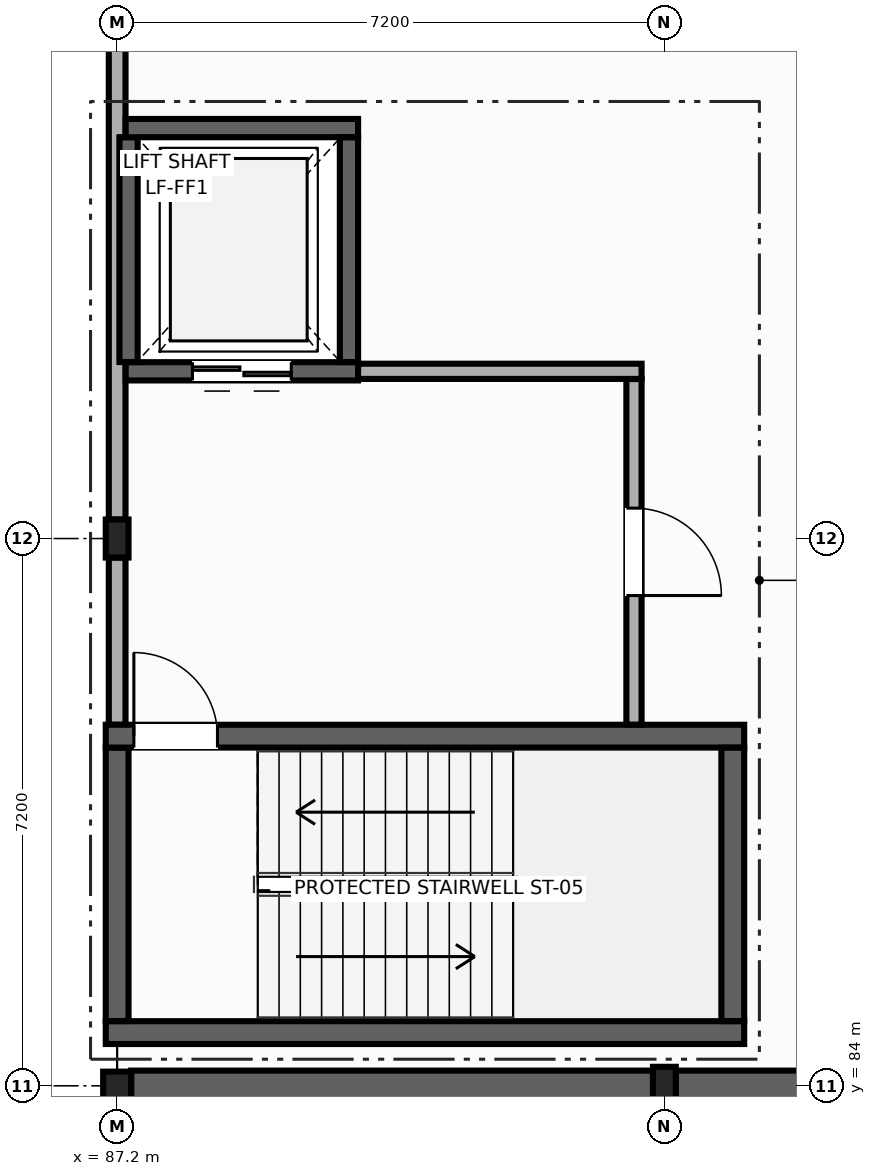
"""IFC4 building model, lengths in metres.
Left out: names, types, materials, properties, quantities, classifications, styles, units other than length and angle.
Written with IfcOpenShell. Run it as: python <this file> out.ifc"""

import sys

from ifc_helpers import new_model, si_unit, direction, frame, frame_2d, origin, origin_2d, place, context, subcontext, project, spatial, rectangle, i_section, extrude, element, fill, save


model = new_model("IFC4")
c1 = context("Model", 3, precision=1e-05, world=origin(), true_north=direction((0.0, 1.0)))
c2 = subcontext(c1, "Body", "Model", "MODEL_VIEW")
j1 = project(units=[si_unit("LENGTHUNIT", "METRE"), si_unit("PLANEANGLEUNIT", "RADIAN")], contexts=[c1])
p1 = place(None, origin())
s1 = spatial("IfcSite", under=j1, at=p1, CompositionType="ELEMENT")
p2 = place(p1, origin())
s2 = spatial("IfcBuilding", under=s1, at=p2, CompositionType="ELEMENT")
p3 = place(p2, frame((0.0, 0.0, 9.9)))
s3 = spatial("IfcBuildingStorey", under=s2, at=p3, CompositionType="ELEMENT", Elevation=9.9)
p4 = place(p3, frame((87.2, 84.0, 0.0), z_axis=(0.0, 0.0, 1.0), x_axis=(0.0, 1.0, 0.0)))
e1 = element("IfcColumn", 1, at=p4, inside=s3, PredefinedType="COLUMN", context=c2, shape_type="SweptSolid", body=[
    extrude(i_section(OverallWidth=0.373, OverallDepth=0.368, WebThickness=0.014, FlangeThickness=0.024, at=origin_2d()), origin(), (0.0, 0.0, 1.0), 4.5),
])
for number, where, z_axis, x_axis in (
    (2, (94.4, 84.0, 0.0), (0.0, 0.0, 1.0), (1.0, 0.0, 0.0)),
    (3, (87.2, 91.2, 0.0), (0.0, 0.0, 1.0), (1.0, 0.0, 0.0)),
):
    element("IfcColumn", number, at=place(p3, frame(where, z_axis=z_axis, x_axis=x_axis)), inside=s3, PredefinedType="COLUMN", context=c2, shape_type="SweptSolid", body=[
        extrude(i_section(OverallWidth=0.3, OverallDepth=0.5, WebThickness=0.014, FlangeThickness=0.028, at=origin_2d()), origin(), (0.0, 0.0, 1.0), 4.5),
    ])
p5 = place(p3, frame((87.2, 88.75, 0.0), z_axis=(0.0, 0.0, 1.0), x_axis=(0.0, 1.0, 0.0)))
e4 = element("IfcWall", 4, at=p5, inside=s3, PredefinedType="SOLIDWALL", context=c2, shape_type="SweptSolid", body=[
    extrude(rectangle(XDim=2.2, YDim=0.22, at=frame_2d((1.1, 0.0))), origin(), (0.0, 0.0, 1.0), 3.645),
])
p6 = place(p3, frame((87.2, 91.45, 0.0), z_axis=(0.0, 0.0, 1.0), x_axis=(0.0, 1.0, 0.0)))
e5 = element("IfcWall", 5, at=p6, inside=s3, PredefinedType="SOLIDWALL", context=c2, shape_type="SweptSolid", body=[
    extrude(rectangle(XDim=6.8, YDim=0.22, at=frame_2d((3.4, 0.0))), origin(), (0.0, 0.0, 1.0), 3.655),
])
p7 = place(p3, frame((95.45, 84.7, 0.0), z_axis=(0.0, 0.0, 1.0), x_axis=(-1.0, 0.0, 0.0)))
e6 = element("IfcWall", 6, at=p7, inside=s3, PredefinedType="SHEAR", context=c2, shape_type="SweptSolid", body=[
    extrude(rectangle(XDim=8.4, YDim=0.3, at=frame_2d((4.2, 0.0))), origin(), (0.0, 0.0, 1.0), 4.26),
])
p8 = place(p3, frame((87.2, 84.852, 0.0), z_axis=(0.0, 0.0, 1.0), x_axis=(0.0, 1.0, 0.0)))
e7 = element("IfcWall", 7, at=p8, inside=s3, PredefinedType="SHEAR", context=c2, shape_type="SweptSolid", body=[
    extrude(rectangle(XDim=3.598, YDim=0.3, at=frame_2d((1.799, 0.0))), origin(), (0.0, 0.0, 1.0), 4.26),
])
p9 = place(p3, frame((87.05, 88.6, 0.0), z_axis=(0.0, 0.0, 1.0), x_axis=(1.0, 0.0, 0.0)))
e8 = element("IfcWall", 8, at=p9, inside=s3, PredefinedType="SHEAR", context=c2, shape_type="SweptSolid", body=[
    extrude(rectangle(XDim=8.4, YDim=0.3, at=frame_2d((4.2, 0.0))), origin(), (0.0, 0.0, 1.0), 4.26),
])
p10 = place(p9, frame((0.37, 0.0, 0.0)))
e9 = element("IfcOpeningElement", 9, at=p10, cuts=e8, PredefinedType="OPENING", context=c2, shape_type="SweptSolid", body=[
    extrude(rectangle(XDim=1.1, YDim=2.15, at=frame_2d((0.55, 1.075))), frame((0.0, 0.16, 0.0), z_axis=(0.0, -1.0, 0.0), x_axis=(1.0, 0.0, 0.0)), (0.0, 0.0, 1.0), 0.32),
])
p11 = place(p3, frame((95.3, 88.448, 0.0), z_axis=(0.0, 0.0, 1.0), x_axis=(0.0, -1.0, 0.0)))
e10 = element("IfcWall", 10, at=p11, inside=s3, PredefinedType="SHEAR", context=c2, shape_type="SweptSolid", body=[
    extrude(rectangle(XDim=3.596, YDim=0.3, at=frame_2d((1.798, 0.0))), origin(), (0.0, 0.0, 1.0), 4.26),
])
p12 = place(p3, frame((90.37, 93.4, 0.0), z_axis=(0.0, 0.0, 1.0), x_axis=(-1.0, 0.0, 0.0)))
e11 = element("IfcWall", 11, at=p12, inside=s3, PredefinedType="SHEAR", context=c2, shape_type="SweptSolid", body=[
    extrude(rectangle(XDim=3.058, YDim=0.24, at=frame_2d((1.529, 0.0))), origin(), (0.0, 0.0, 1.0), 4.26),
])
p13 = place(p12, frame((0.879, 0.0, 0.0)))
e12 = element("IfcOpeningElement", 12, at=p13, cuts=e11, PredefinedType="OPENING", context=c2, shape_type="SweptSolid", body=[
    extrude(rectangle(XDim=1.3, YDim=2.15, at=frame_2d((0.65, 1.075))), frame((0.0, 0.13, 0.0), z_axis=(0.0, -1.0, 0.0), x_axis=(1.0, 0.0, 0.0)), (0.0, 0.0, 1.0), 0.26),
])
p14 = place(p3, frame((87.35, 93.522, 0.0), z_axis=(0.0, 0.0, 1.0), x_axis=(0.0, 1.0, 0.0)))
e13 = element("IfcWall", 13, at=p14, inside=s3, PredefinedType="SHEAR", context=c2, shape_type="SweptSolid", body=[
    extrude(rectangle(XDim=2.958, YDim=0.24, at=frame_2d((1.479, 0.0))), origin(), (0.0, 0.0, 1.0), 4.26),
])
p15 = place(p3, frame((87.312, 96.6, 0.0), z_axis=(0.0, 0.0, 1.0), x_axis=(1.0, 0.0, 0.0)))
e14 = element("IfcWall", 14, at=p15, inside=s3, PredefinedType="SHEAR", context=c2, shape_type="SweptSolid", body=[
    extrude(rectangle(XDim=3.058, YDim=0.24, at=frame_2d((1.529, 0.0))), origin(), (0.0, 0.0, 1.0), 4.26),
])
p16 = place(p3, frame((90.25, 96.478, 0.0), z_axis=(0.0, 0.0, 1.0), x_axis=(0.0, -1.0, 0.0)))
e15 = element("IfcWall", 15, at=p16, inside=s3, PredefinedType="SHEAR", context=c2, shape_type="SweptSolid", body=[
    extrude(rectangle(XDim=2.956, YDim=0.24, at=frame_2d((1.478, 0.0))), origin(), (0.0, 0.0, 1.0), 4.26),
])
p17 = place(p3, frame((90.37, 93.4, 0.0), z_axis=(0.0, 0.0, 1.0), x_axis=(1.0, 0.0, 0.0)))
e16 = element("IfcWall", 16, at=p17, inside=s3, PredefinedType="PARTITIONING", context=c2, shape_type="SweptSolid", body=[
    extrude(rectangle(XDim=3.73, YDim=0.2, at=frame_2d((1.865, 0.0))), origin(), (0.0, 0.0, 1.0), 4.26),
])
p18 = place(p3, frame((94.0, 93.298, 0.0), z_axis=(0.0, 0.0, 1.0), x_axis=(0.0, -1.0, 0.0)))
e17 = element("IfcWall", 17, at=p18, inside=s3, PredefinedType="PARTITIONING", context=c2, shape_type="SweptSolid", body=[
    extrude(rectangle(XDim=4.546, YDim=0.2, at=frame_2d((2.273, 0.0))), origin(), (0.0, 0.0, 1.0), 4.26),
])
p19 = place(p18, frame((1.698, 0.0, 0.0)))
e18 = element("IfcOpeningElement", 18, at=p19, cuts=e17, PredefinedType="OPENING", context=c2, shape_type="SweptSolid", body=[
    extrude(rectangle(XDim=1.15, YDim=2.15, at=frame_2d((0.575, 1.075))), frame((0.0, 0.11, 0.0), z_axis=(0.0, -1.0, 0.0), x_axis=(1.0, 0.0, 0.0)), (0.0, 0.0, 1.0), 0.22),
])
p20 = place(p3, frame((87.384, 84.0, 0.0), z_axis=(0.0, 0.0, 1.0), x_axis=(1.0, 0.0, 0.0)))
e19 = element("IfcWall", 19, at=p20, inside=s3, PredefinedType="SHEAR", context=c2, shape_type="SweptSolid", body=[
    extrude(rectangle(XDim=6.866, YDim=0.4, at=frame_2d((3.433, 0.0))), origin(), (0.0, 0.0, 1.0), 4.25),
])
p21 = place(p3, frame((94.55, 84.0, 0.0), z_axis=(0.0, 0.0, 1.0), x_axis=(1.0, 0.0, 0.0)))
e20 = element("IfcWall", 20, at=p21, inside=s3, PredefinedType="SHEAR", context=c2, shape_type="SweptSolid", body=[
    extrude(rectangle(XDim=6.8, YDim=0.4, at=frame_2d((3.4, 0.0))), origin(), (0.0, 0.0, 1.0), 4.26),
])
p22 = place(p10, origin())
e21 = element("IfcDoor", 21, at=p22, inside=s3, OperationType="SINGLE_SWING_LEFT", PredefinedType="DOOR", context=c2, shape_type="SweptSolid", body=[
    extrude(rectangle(XDim=1.1, YDim=2.15, at=frame_2d((0.55, 1.075))), frame((0.0, 0.025, 0.0), z_axis=(0.0, -1.0, 0.0), x_axis=(1.0, 0.0, 0.0)), (0.0, 0.0, 1.0), 0.05),
])
fill(e9, e21)
p23 = place(p13, origin())
e22 = element("IfcDoor", 22, at=p23, inside=s3, OperationType="DOUBLE_DOOR_SLIDING", PredefinedType="DOOR", context=c2, shape_type="SweptSolid", body=[
    extrude(rectangle(XDim=1.3, YDim=2.15, at=frame_2d((0.65, 1.075))), frame((0.0, 0.025, 0.0), z_axis=(0.0, -1.0, 0.0), x_axis=(1.0, 0.0, 0.0)), (0.0, 0.0, 1.0), 0.05),
])
fill(e12, e22)
p24 = place(p19, origin())
e23 = element("IfcDoor", 23, at=p24, inside=s3, OperationType="SINGLE_SWING_RIGHT", PredefinedType="DOOR", context=c2, shape_type="SweptSolid", body=[
    extrude(rectangle(XDim=1.15, YDim=2.15, at=frame_2d((0.575, 1.075))), frame((0.0, 0.025, 0.0), z_axis=(0.0, -1.0, 0.0), x_axis=(1.0, 0.0, 0.0)), (0.0, 0.0, 1.0), 0.05),
])
fill(e18, e23)
save(model, sys.argv[1])
